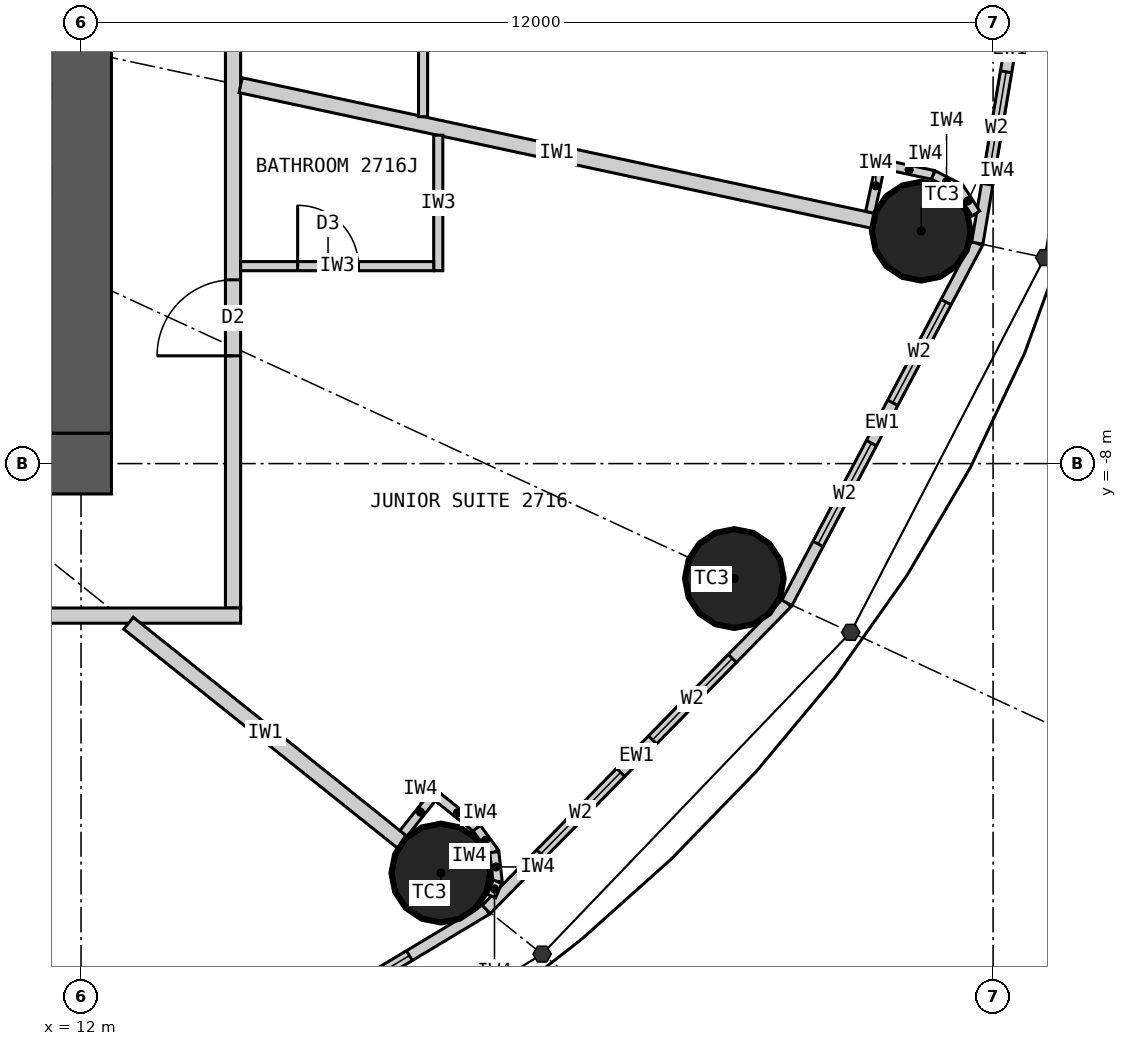
"""IFC4 building model, lengths in metres.
Left out: names, types, materials, properties, quantities, classifications, styles, units other than length and angle.
Written with IfcOpenShell. Run it as: python <this file> out.ifc"""

import sys

from ifc_helpers import new_model, si_unit, direction, frame, frame_2d, origin, origin_2d, place, context, subcontext, project, spatial, rectangle, circle, extrude, element, fill, save


model = new_model("IFC4")
c1 = context("Model", 3, precision=1e-05, world=origin(), true_north=direction((0.0, 1.0)))
c2 = subcontext(c1, "Body", "Model", "MODEL_VIEW")
j1 = project(units=[si_unit("LENGTHUNIT", "METRE"), si_unit("PLANEANGLEUNIT", "RADIAN")], contexts=[c1])
p1 = place(None, origin())
s1 = spatial("IfcSite", under=j1, at=p1, CompositionType="ELEMENT")
p2 = place(p1, origin())
s2 = spatial("IfcBuilding", under=s1, at=p2, CompositionType="ELEMENT")
p3 = place(p2, frame((0.0, 0.0, 108.9)))
s3 = spatial("IfcBuildingStorey", under=s2, at=p3, CompositionType="ELEMENT", Elevation=108.9)
for number, where, z_axis, x_axis in (
    (1, (16.734, -13.387, 0.0), (0.0, 0.0, 1.0), (1.0, 0.0, 0.0)),
    (2, (20.596, -9.513, 0.0), (0.0, 0.0, 1.0), (1.0, 0.0, 0.0)),
    (3, (23.055, -4.942, 0.0), (0.0, 0.0, 1.0), (1.0, 0.0, 0.0)),
):
    element("IfcColumn", number, at=place(p3, frame(where, z_axis=z_axis, x_axis=x_axis)), inside=s3, PredefinedType="COLUMN", context=c2, shape_type="SweptSolid", body=[
        extrude(circle(Radius=0.65, at=origin_2d()), origin(), (0.0, 0.0, 1.0), 3.3),
    ])
p4 = place(p3, frame((12.4, -8.0, 0.0), z_axis=(0.0, 0.0, 1.0), x_axis=(-1.0, 0.0, 0.0)))
e4 = element("IfcWall", 4, at=p4, inside=s3, PredefinedType="SHEAR", context=c2, shape_type="SweptSolid", body=[
    extrude(rectangle(XDim=24.8, YDim=0.8, at=frame_2d((12.4, 0.0))), origin(), (0.0, 0.0, 1.0), 3.3),
])
p5 = place(p4, frame((11.1, 0.0, 0.0)))
e5 = element("IfcOpeningElement", 5, at=p5, cuts=e4, PredefinedType="OPENING", context=c2, shape_type="SweptSolid", body=[
    extrude(rectangle(XDim=1.2, YDim=2.2, at=frame_2d((0.6, 1.1))), frame((0.0, 0.41, 0.0), z_axis=(0.0, -1.0, 0.0), x_axis=(1.0, 0.0, 0.0)), (0.0, 0.0, 1.0), 0.82),
])
p6 = place(p4, frame((18.7, 0.0, 0.0)))
e6 = element("IfcOpeningElement", 6, at=p6, cuts=e4, PredefinedType="OPENING", context=c2, shape_type="SweptSolid", body=[
    extrude(rectangle(XDim=0.9, YDim=2.2, at=frame_2d((0.45, 1.1))), frame((0.0, 0.41, 0.0), z_axis=(0.0, -1.0, 0.0), x_axis=(1.0, 0.0, 0.0)), (0.0, 0.0, 1.0), 0.82),
])
p7 = place(p3, frame((12.0, -7.6, 0.0), z_axis=(0.0, 0.0, 1.0), x_axis=(0.0, 1.0, 0.0)))
e7 = element("IfcWall", 7, at=p7, inside=s3, PredefinedType="SHEAR", context=c2, shape_type="SweptSolid", body=[
    extrude(rectangle(XDim=15.2, YDim=0.8, at=frame_2d((7.6, 0.0))), origin(), (0.0, 0.0, 1.0), 3.3),
])
p8 = place(p7, frame((6.7, 0.0, 0.0)))
e8 = element("IfcOpeningElement", 8, at=p8, cuts=e7, PredefinedType="OPENING", context=c2, shape_type="SweptSolid", body=[
    extrude(rectangle(XDim=1.8, YDim=2.2, at=frame_2d((0.9, 1.1))), frame((0.0, 0.41, 0.0), z_axis=(0.0, -1.0, 0.0), x_axis=(1.0, 0.0, 0.0)), (0.0, 0.0, 1.0), 0.82),
])
p9 = place(p3, frame((12.221, -16.935, 0.0), z_axis=(0.0, 0.0, 1.0), x_axis=(0.857308573723, 0.514802884044, 0.0)))
e9 = element("IfcWall", 9, at=p9, inside=s3, PredefinedType="ELEMENTEDWALL", context=c2, shape_type="SweptSolid", body=[
    extrude(rectangle(XDim=5.961, YDim=0.15, at=frame_2d((2.98, 0.0))), origin(), (0.0, 0.0, 1.0), 3.12),
])
p10 = place(p9, frame((1.181, 0.0, 0.9)))
e10 = element("IfcOpeningElement", 10, at=p10, cuts=e9, PredefinedType="OPENING", context=c2, shape_type="SweptSolid", body=[
    extrude(rectangle(XDim=1.5, YDim=1.9, at=frame_2d((0.75, 0.95))), frame((0.0, 0.085, 0.0), z_axis=(0.0, -1.0, 0.0), x_axis=(1.0, 0.0, 0.0)), (0.0, 0.0, 1.0), 0.17),
])
p11 = place(p9, frame((3.281, 0.0, 0.9)))
e11 = element("IfcOpeningElement", 11, at=p11, cuts=e9, PredefinedType="OPENING", context=c2, shape_type="SweptSolid", body=[
    extrude(rectangle(XDim=1.5, YDim=1.9, at=frame_2d((0.75, 0.95))), frame((0.0, 0.085, 0.0), z_axis=(0.0, -1.0, 0.0), x_axis=(1.0, 0.0, 0.0)), (0.0, 0.0, 1.0), 0.17),
])
p12 = place(p3, frame((17.332, -13.866, 0.0), z_axis=(0.0, 0.0, 1.0), x_axis=(0.700136650834, 0.714008872605, 0.0)))
e12 = element("IfcWall", 12, at=p12, inside=s3, PredefinedType="ELEMENTEDWALL", context=c2, shape_type="SweptSolid", body=[
    extrude(rectangle(XDim=5.649, YDim=0.15, at=frame_2d((2.825, 0.0))), origin(), (0.0, 0.0, 1.0), 3.12),
])
p13 = place(p12, frame((1.025, 0.0, 0.9)))
e13 = element("IfcOpeningElement", 13, at=p13, cuts=e12, PredefinedType="OPENING", context=c2, shape_type="SweptSolid", body=[
    extrude(rectangle(XDim=1.5, YDim=1.9, at=frame_2d((0.75, 0.95))), frame((0.0, 0.085, 0.0), z_axis=(0.0, -1.0, 0.0), x_axis=(1.0, 0.0, 0.0)), (0.0, 0.0, 1.0), 0.17),
])
p14 = place(p12, frame((3.125, 0.0, 0.9)))
e14 = element("IfcOpeningElement", 14, at=p14, cuts=e12, PredefinedType="OPENING", context=c2, shape_type="SweptSolid", body=[
    extrude(rectangle(XDim=1.5, YDim=1.9, at=frame_2d((0.75, 0.95))), frame((0.0, 0.085, 0.0), z_axis=(0.0, -1.0, 0.0), x_axis=(1.0, 0.0, 0.0)), (0.0, 0.0, 1.0), 0.17),
])
p15 = place(p3, frame((21.287, -9.832, 0.0), z_axis=(0.0, 0.0, 1.0), x_axis=(0.467814388454, 0.883826735257, 0.0)))
e15 = element("IfcWall", 15, at=p15, inside=s3, PredefinedType="ELEMENTEDWALL", context=c2, shape_type="SweptSolid", body=[
    extrude(rectangle(XDim=5.354, YDim=0.15, at=frame_2d((2.677, 0.0))), origin(), (0.0, 0.0, 1.0), 3.12),
])
p16 = place(p15, frame((0.877, 0.0, 0.9)))
e16 = element("IfcOpeningElement", 16, at=p16, cuts=e15, PredefinedType="OPENING", context=c2, shape_type="SweptSolid", body=[
    extrude(rectangle(XDim=1.5, YDim=1.9, at=frame_2d((0.75, 0.95))), frame((0.0, 0.085, 0.0), z_axis=(0.0, -1.0, 0.0), x_axis=(1.0, 0.0, 0.0)), (0.0, 0.0, 1.0), 0.17),
])
p17 = place(p15, frame((2.977, 0.0, 0.9)))
e17 = element("IfcOpeningElement", 17, at=p17, cuts=e15, PredefinedType="OPENING", context=c2, shape_type="SweptSolid", body=[
    extrude(rectangle(XDim=1.5, YDim=1.9, at=frame_2d((0.75, 0.95))), frame((0.0, 0.085, 0.0), z_axis=(0.0, -1.0, 0.0), x_axis=(1.0, 0.0, 0.0)), (0.0, 0.0, 1.0), 0.17),
])
p18 = place(p3, frame((23.792, -5.1, 0.0), z_axis=(0.0, 0.0, 1.0), x_axis=(0.165883894218, 0.986145290329, 0.0)))
e18 = element("IfcWall", 18, at=p18, inside=s3, PredefinedType="ELEMENTEDWALL", context=c2, shape_type="SweptSolid", body=[
    extrude(rectangle(XDim=5.172, YDim=0.15, at=frame_2d((2.586, 0.0))), origin(), (0.0, 0.0, 1.0), 3.12),
])
p19 = place(p18, frame((0.786, 0.0, 0.9)))
e19 = element("IfcOpeningElement", 19, at=p19, cuts=e18, PredefinedType="OPENING", context=c2, shape_type="SweptSolid", body=[
    extrude(rectangle(XDim=1.5, YDim=1.9, at=frame_2d((0.75, 0.95))), frame((0.0, 0.085, 0.0), z_axis=(0.0, -1.0, 0.0), x_axis=(1.0, 0.0, 0.0)), (0.0, 0.0, 1.0), 0.17),
])
p20 = place(p18, frame((2.886, 0.0, 0.9)))
e20 = element("IfcOpeningElement", 20, at=p20, cuts=e18, PredefinedType="OPENING", context=c2, shape_type="SweptSolid", body=[
    extrude(rectangle(XDim=1.5, YDim=1.9, at=frame_2d((0.75, 0.95))), frame((0.0, 0.085, 0.0), z_axis=(0.0, -1.0, 0.0), x_axis=(1.0, 0.0, 0.0)), (0.0, 0.0, 1.0), 0.17),
])
p21 = place(p3, frame((14.0, -9.9, 0.0), z_axis=(0.0, 0.0, 1.0), x_axis=(0.0, 1.0, 0.0)))
e21 = element("IfcWall", 21, at=p21, inside=s3, PredefinedType="PARTITIONING", context=c2, shape_type="SweptSolid", body=[
    extrude(rectangle(XDim=19.8, YDim=0.2, at=frame_2d((9.9, 0.0))), origin(), (0.0, 0.0, 1.0), 3.12),
])
p22 = place(p21, frame((3.318, 0.0, 0.0)))
e22 = element("IfcOpeningElement", 22, at=p22, cuts=e21, PredefinedType="OPENING", context=c2, shape_type="SweptSolid", body=[
    extrude(rectangle(XDim=1.0, YDim=2.2, at=frame_2d((0.5, 1.1))), frame((0.0, 0.11, 0.0), z_axis=(0.0, -1.0, 0.0), x_axis=(1.0, 0.0, 0.0)), (0.0, 0.0, 1.0), 0.22),
])
p23 = place(p21, frame((9.238, 0.0, 0.0)))
e23 = element("IfcOpeningElement", 23, at=p23, cuts=e21, PredefinedType="OPENING", context=c2, shape_type="SweptSolid", body=[
    extrude(rectangle(XDim=1.0, YDim=2.2, at=frame_2d((0.5, 1.1))), frame((0.0, 0.11, 0.0), z_axis=(0.0, -1.0, 0.0), x_axis=(1.0, 0.0, 0.0)), (0.0, 0.0, 1.0), 0.22),
])
p24 = place(p21, frame((13.742, 0.0, 0.0)))
e24 = element("IfcOpeningElement", 24, at=p24, cuts=e21, PredefinedType="OPENING", context=c2, shape_type="SweptSolid", body=[
    extrude(rectangle(XDim=1.0, YDim=2.2, at=frame_2d((0.5, 1.1))), frame((0.0, 0.11, 0.0), z_axis=(0.0, -1.0, 0.0), x_axis=(1.0, 0.0, 0.0)), (0.0, 0.0, 1.0), 0.22),
])
p25 = place(p21, frame((18.698, 0.0, 0.0)))
e25 = element("IfcOpeningElement", 25, at=p25, cuts=e21, PredefinedType="OPENING", context=c2, shape_type="SweptSolid", body=[
    extrude(rectangle(XDim=1.0, YDim=2.2, at=frame_2d((0.5, 1.1))), frame((0.0, 0.11, 0.0), z_axis=(0.0, -1.0, 0.0), x_axis=(1.0, 0.0, 0.0)), (0.0, 0.0, 1.0), 0.22),
])
p26 = place(p3, frame((14.1, -10.0, 0.0), z_axis=(0.0, 0.0, 1.0), x_axis=(-1.0, 0.0, 0.0)))
e26 = element("IfcWall", 26, at=p26, inside=s3, PredefinedType="PARTITIONING", context=c2, shape_type="SweptSolid", body=[
    extrude(rectangle(XDim=10.817, YDim=0.2, at=frame_2d((5.409, 0.0))), origin(), (0.0, 0.0, 1.0), 3.12),
])
p27 = place(p3, frame((12.625, -10.1, 0.0), z_axis=(0.0, 0.0, 1.0), x_axis=(0.780863644897, -0.624701503182, 0.0)))
e27 = element("IfcWall", 27, at=p27, inside=s3, PredefinedType="PARTITIONING", context=c2, shape_type="SweptSolid", body=[
    extrude(rectangle(XDim=4.612, YDim=0.2, at=frame_2d((2.306, 0.0))), origin(), (0.0, 0.0, 1.0), 2.37),
])
p28 = place(p3, frame((14.1, -3.022, 0.0), z_axis=(0.0, 0.0, 1.0), x_axis=(0.977783513367, -0.209617272638, 0.0)))
e28 = element("IfcWall", 28, at=p28, inside=s3, PredefinedType="PARTITIONING", context=c2, shape_type="SweptSolid", body=[
    extrude(rectangle(XDim=8.508, YDim=0.2, at=frame_2d((4.254, 0.0))), origin(), (0.0, 0.0, 1.0), 2.37),
])
p29 = place(p3, frame((16.7, -3.68, 0.0), z_axis=(0.0, 0.0, 1.0), x_axis=(0.0, -1.0, 0.0)))
e29 = element("IfcWall", 29, at=p29, inside=s3, PredefinedType="PARTITIONING", context=c2, shape_type="SweptSolid", body=[
    extrude(rectangle(XDim=1.783, YDim=0.12, at=frame_2d((0.891, 0.0))), origin(), (0.0, 0.0, 1.0), 3.12),
])
p30 = place(p3, frame((14.1, -5.403, 0.0), z_axis=(0.0, 0.0, 1.0), x_axis=(1.0, 0.0, 0.0)))
e30 = element("IfcWall", 30, at=p30, inside=s3, PredefinedType="PARTITIONING", context=c2, shape_type="SweptSolid", body=[
    extrude(rectangle(XDim=2.54, YDim=0.12, at=frame_2d((1.27, 0.0))), origin(), (0.0, 0.0, 1.0), 3.12),
])
p31 = place(p30, frame((0.75, 0.0, 0.0)))
e31 = element("IfcOpeningElement", 31, at=p31, cuts=e30, PredefinedType="OPENING", context=c2, shape_type="SweptSolid", body=[
    extrude(rectangle(XDim=0.8, YDim=2.1, at=frame_2d((0.4, 1.05))), frame((0.0, 0.07, 0.0), z_axis=(0.0, -1.0, 0.0), x_axis=(1.0, 0.0, 0.0)), (0.0, 0.0, 1.0), 0.14),
])
p32 = place(p3, frame((16.5, -3.437, 0.0), z_axis=(0.0, 0.0, 1.0), x_axis=(0.0, 1.0, 0.0)))
e32 = element("IfcWall", 32, at=p32, inside=s3, PredefinedType="PARTITIONING", context=c2, shape_type="SweptSolid", body=[
    extrude(rectangle(XDim=2.655, YDim=0.12, at=frame_2d((1.327, 0.0))), origin(), (0.0, 0.0, 1.0), 3.12),
])
p33 = place(p3, frame((16.242, -12.865, 0.0), z_axis=(0.0, 0.0, 1.0), x_axis=(0.624861414622, 0.780735686719, 0.0)))
e33 = element("IfcWall", 33, at=p33, inside=s3, PredefinedType="PARTITIONING", context=c2, shape_type="SweptSolid", body=[
    extrude(rectangle(XDim=0.716, YDim=0.12, at=frame_2d((0.358, 0.0))), origin(), (0.0, 0.0, 1.0), 3.12),
])
p34 = place(p3, frame((16.698, -12.391, 0.0), z_axis=(0.0, 0.0, 1.0), x_axis=(0.780722240533, -0.624878214645, 0.0)))
e34 = element("IfcWall", 34, at=p34, inside=s3, PredefinedType="PARTITIONING", context=c2, shape_type="SweptSolid", body=[
    extrude(rectangle(XDim=0.65, YDim=0.12, at=frame_2d((0.325, 0.0))), origin(), (0.0, 0.0, 1.0), 3.12),
])
p35 = place(p3, frame((17.206, -12.797, 0.0), z_axis=(0.0, 0.0, 1.0), x_axis=(0.592986095904, -0.805212698648, 0.0)))
e35 = element("IfcWall", 35, at=p35, inside=s3, PredefinedType="PARTITIONING", context=c2, shape_type="SweptSolid", body=[
    extrude(rectangle(XDim=0.391, YDim=0.12, at=frame_2d((0.196, 0.0))), origin(), (0.0, 0.0, 1.0), 3.12),
])
p36 = place(p3, frame((17.438, -13.112, 0.0), z_axis=(0.0, 0.0, 1.0), x_axis=(0.109815164188, -0.993952025862, 0.0)))
e36 = element("IfcWall", 36, at=p36, inside=s3, PredefinedType="PARTITIONING", context=c2, shape_type="SweptSolid", body=[
    extrude(rectangle(XDim=0.391, YDim=0.12, at=frame_2d((0.196, 0.0))), origin(), (0.0, 0.0, 1.0), 3.12),
])
p37 = place(p3, frame((17.481, -13.501, 0.0), z_axis=(0.0, 0.0, 1.0), x_axis=(-0.401504188288, -0.915857186895, 0.0)))
e37 = element("IfcWall", 37, at=p37, inside=s3, PredefinedType="PARTITIONING", context=c2, shape_type="SweptSolid", body=[
    extrude(rectangle(XDim=0.206, YDim=0.12, at=frame_2d((0.103, 0.0))), origin(), (0.0, 0.0, 1.0), 3.12),
])
p38 = place(p3, frame((22.382, -4.695, 0.0), z_axis=(0.0, 0.0, 1.0), x_axis=(0.209808658628, 0.977742464438, 0.0)))
e38 = element("IfcWall", 38, at=p38, inside=s3, PredefinedType="PARTITIONING", context=c2, shape_type="SweptSolid", body=[
    extrude(rectangle(XDim=0.716, YDim=0.12, at=frame_2d((0.358, 0.0))), origin(), (0.0, 0.0, 1.0), 3.12),
])
p39 = place(p3, frame((22.578, -4.067, 0.0), z_axis=(0.0, 0.0, 1.0), x_axis=(0.977802414077, -0.209529088731, 0.0)))
e39 = element("IfcWall", 39, at=p39, inside=s3, PredefinedType="PARTITIONING", context=c2, shape_type="SweptSolid", body=[
    extrude(rectangle(XDim=0.65, YDim=0.12, at=frame_2d((0.325, 0.0))), origin(), (0.0, 0.0, 1.0), 3.12),
])
for number, where, z_axis, x_axis in (
    (40, (23.213, -4.203, 0.0), (0.0, 0.0, 1.0), (0.89, -0.456, 0.0)),
    (41, (23.562, -4.381, 0.0), (0.0, 0.0, 1.0), (0.543, -0.84, 0.0)),
):
    element("IfcWall", number, at=place(p3, frame(where, z_axis=z_axis, x_axis=x_axis)), inside=s3, PredefinedType="PARTITIONING", context=c2, shape_type="SweptSolid", body=[
        extrude(rectangle(XDim=0.391, YDim=0.12, at=frame_2d((0.196, 0.0))), origin(), (0.0, 0.0, 1.0), 3.12),
    ])
p40 = place(p11, origin())
e42 = element("IfcWindow", 42, at=p40, inside=s3, PartitioningType="SINGLE_PANEL", PredefinedType="WINDOW", context=c2, shape_type="SweptSolid", body=[
    extrude(rectangle(XDim=1.5, YDim=1.9, at=frame_2d((0.75, 0.95))), frame((0.0, 0.03, 0.0), z_axis=(0.0, -1.0, 0.0), x_axis=(1.0, 0.0, 0.0)), (0.0, 0.0, 1.0), 0.06),
])
fill(e11, e42)
p41 = place(p13, origin())
e43 = element("IfcWindow", 43, at=p41, inside=s3, PartitioningType="SINGLE_PANEL", PredefinedType="WINDOW", context=c2, shape_type="SweptSolid", body=[
    extrude(rectangle(XDim=1.5, YDim=1.9, at=frame_2d((0.75, 0.95))), frame((0.0, 0.03, 0.0), z_axis=(0.0, -1.0, 0.0), x_axis=(1.0, 0.0, 0.0)), (0.0, 0.0, 1.0), 0.06),
])
fill(e13, e43)
p42 = place(p14, origin())
e44 = element("IfcWindow", 44, at=p42, inside=s3, PartitioningType="SINGLE_PANEL", PredefinedType="WINDOW", context=c2, shape_type="SweptSolid", body=[
    extrude(rectangle(XDim=1.5, YDim=1.9, at=frame_2d((0.75, 0.95))), frame((0.0, 0.03, 0.0), z_axis=(0.0, -1.0, 0.0), x_axis=(1.0, 0.0, 0.0)), (0.0, 0.0, 1.0), 0.06),
])
fill(e14, e44)
p43 = place(p16, origin())
e45 = element("IfcWindow", 45, at=p43, inside=s3, PartitioningType="SINGLE_PANEL", PredefinedType="WINDOW", context=c2, shape_type="SweptSolid", body=[
    extrude(rectangle(XDim=1.5, YDim=1.9, at=frame_2d((0.75, 0.95))), frame((0.0, 0.03, 0.0), z_axis=(0.0, -1.0, 0.0), x_axis=(1.0, 0.0, 0.0)), (0.0, 0.0, 1.0), 0.06),
])
fill(e16, e45)
p44 = place(p17, origin())
e46 = element("IfcWindow", 46, at=p44, inside=s3, PartitioningType="SINGLE_PANEL", PredefinedType="WINDOW", context=c2, shape_type="SweptSolid", body=[
    extrude(rectangle(XDim=1.5, YDim=1.9, at=frame_2d((0.75, 0.95))), frame((0.0, 0.03, 0.0), z_axis=(0.0, -1.0, 0.0), x_axis=(1.0, 0.0, 0.0)), (0.0, 0.0, 1.0), 0.06),
])
fill(e17, e46)
p45 = place(p19, origin())
e47 = element("IfcWindow", 47, at=p45, inside=s3, PartitioningType="SINGLE_PANEL", PredefinedType="WINDOW", context=c2, shape_type="SweptSolid", body=[
    extrude(rectangle(XDim=1.5, YDim=1.9, at=frame_2d((0.75, 0.95))), frame((0.0, 0.03, 0.0), z_axis=(0.0, -1.0, 0.0), x_axis=(1.0, 0.0, 0.0)), (0.0, 0.0, 1.0), 0.06),
])
fill(e19, e47)
p46 = place(p31, origin())
e48 = element("IfcDoor", 48, at=p46, inside=s3, OperationType="SINGLE_SWING_LEFT", PredefinedType="DOOR", context=c2, shape_type="SweptSolid", body=[
    extrude(rectangle(XDim=0.8, YDim=2.1, at=frame_2d((0.4, 1.05))), frame((0.0, 0.025, 0.0), z_axis=(0.0, -1.0, 0.0), x_axis=(1.0, 0.0, 0.0)), (0.0, 0.0, 1.0), 0.05),
])
fill(e31, e48)
p47 = place(p22, origin())
e49 = element("IfcDoor", 49, at=p47, inside=s3, OperationType="SINGLE_SWING_LEFT", PredefinedType="DOOR", context=c2, shape_type="SweptSolid", body=[
    extrude(rectangle(XDim=1.0, YDim=2.2, at=frame_2d((0.5, 1.1))), frame((0.0, 0.025, 0.0), z_axis=(0.0, -1.0, 0.0), x_axis=(1.0, 0.0, 0.0)), (0.0, 0.0, 1.0), 0.05),
])
fill(e22, e49)
save(model, sys.argv[1])
